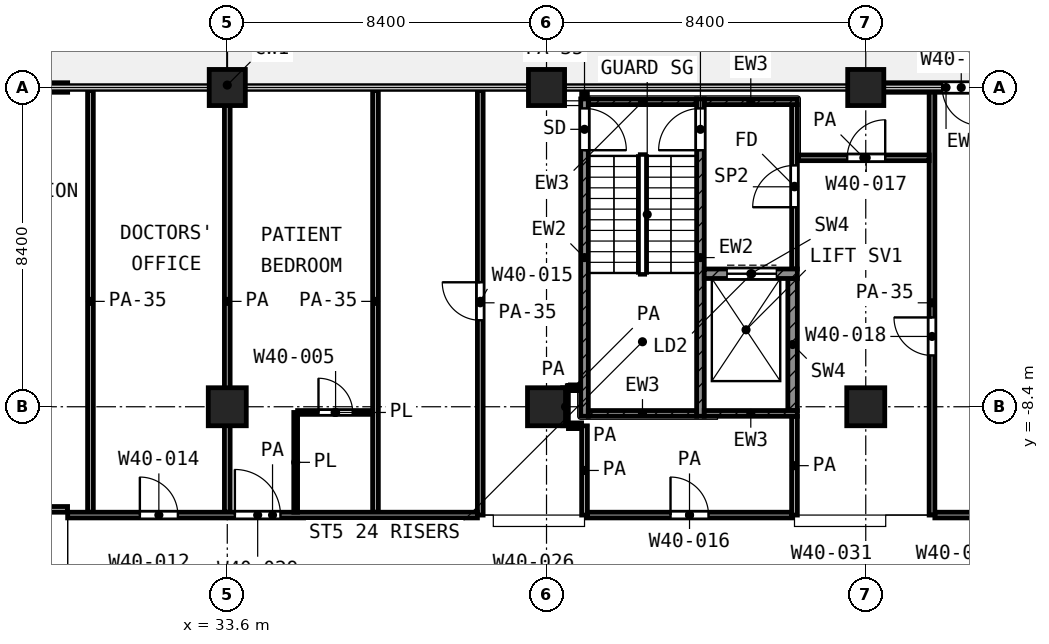
"""IFC4 building model, lengths in metres.
Left out: names, types, materials, properties, quantities, classifications, styles, units other than length and angle.
Written with IfcOpenShell. Run it as: python <this file> out.ifc"""

import sys

from ifc_helpers import new_model, si_unit, direction, frame, frame_2d, origin, origin_2d, place, context, subcontext, project, spatial, rectangle, extrude, element, fill, save


model = new_model("IFC4")
c1 = context("Model", 3, precision=1e-05, world=origin(), true_north=direction((0.0, 1.0)))
c2 = subcontext(c1, "Body", "Model", "MODEL_VIEW")
j1 = project(units=[si_unit("LENGTHUNIT", "METRE"), si_unit("PLANEANGLEUNIT", "RADIAN")], contexts=[c1])
p1 = place(None, origin())
s1 = spatial("IfcSite", under=j1, at=p1, CompositionType="ELEMENT")
p2 = place(p1, origin())
s2 = spatial("IfcBuilding", under=s1, at=p2, CompositionType="ELEMENT")
p3 = place(p2, frame((0.0, 0.0, 196.2)))
s3 = spatial("IfcBuildingStorey", under=s2, at=p3, CompositionType="ELEMENT", Elevation=196.2)
for number, where, z_axis, x_axis in (
    (1, (33.6, 0.0, 0.0), (0.0, 0.0, 1.0), (1.0, 0.0, 0.0)),
    (2, (42.0, 0.0, 0.0), (0.0, 0.0, 1.0), (1.0, 0.0, 0.0)),
    (3, (50.4, 0.0, 0.0), (0.0, 0.0, 1.0), (1.0, 0.0, 0.0)),
):
    element("IfcColumn", number, at=place(p3, frame(where, z_axis=z_axis, x_axis=x_axis)), inside=s3, PredefinedType="COLUMN", context=c2, shape_type="SweptSolid", body=[
        extrude(rectangle(XDim=0.95, YDim=0.95, at=origin_2d()), origin(), (0.0, 0.0, 1.0), 4.2),
    ])
for number, where, z_axis, x_axis in (
    (4, (33.6, -8.4, 0.0), (0.0, 0.0, 1.0), (1.0, 0.0, 0.0)),
    (5, (42.0, -8.4, 0.0), (0.0, 0.0, 1.0), (1.0, 0.0, 0.0)),
    (6, (50.4, -8.4, 0.0), (0.0, 0.0, 1.0), (1.0, 0.0, 0.0)),
):
    element("IfcColumn", number, at=place(p3, frame(where, z_axis=z_axis, x_axis=x_axis)), inside=s3, PredefinedType="COLUMN", context=c2, shape_type="SweptSolid", body=[
        extrude(rectangle(XDim=1.0, YDim=1.0, at=origin_2d()), origin(), (0.0, 0.0, 1.0), 4.2),
    ])
p4 = place(p3, frame((54.15, 0.0, 0.0), z_axis=(0.0, 0.0, 1.0), x_axis=(-1.0, 0.0, 0.0)))
e7 = element("IfcWall", 7, at=p4, inside=s3, PredefinedType="SOLIDWALL", context=c2, shape_type="SweptSolid", body=[
    extrude(rectangle(XDim=3.275, YDim=0.25, at=frame_2d((1.637, 0.0))), origin(), (0.0, 0.0, 1.0), 2.58),
])
p5 = place(p4, frame((0.738, 0.0, 0.0)))
e8 = element("IfcOpeningElement", 8, at=p5, cuts=e7, PredefinedType="OPENING", context=c2, shape_type="SweptSolid", body=[
    extrude(rectangle(XDim=1.0, YDim=2.1, at=frame_2d((0.5, 1.05))), frame((0.0, 0.135, 0.0), z_axis=(0.0, -1.0, 0.0), x_axis=(1.0, 0.0, 0.0)), (0.0, 0.0, 1.0), 0.27),
])
p6 = place(p3, frame((29.4, 0.0, 0.0), z_axis=(0.0, 0.0, 1.0), x_axis=(-1.0, 0.0, 0.0)))
e9 = element("IfcWall", 9, at=p6, inside=s3, PredefinedType="SOLIDWALL", context=c2, shape_type="SweptSolid", body=[
    extrude(rectangle(XDim=3.725, YDim=0.25, at=frame_2d((1.862, 0.0))), origin(), (0.0, 0.0, 1.0), 2.58),
])
p7 = place(p6, frame((0.962, 0.0, 0.0)))
e10 = element("IfcOpeningElement", 10, at=p7, cuts=e9, PredefinedType="OPENING", context=c2, shape_type="SweptSolid", body=[
    extrude(rectangle(XDim=1.8, YDim=2.1, at=frame_2d((0.9, 1.05))), frame((0.0, 0.135, 0.0), z_axis=(0.0, -1.0, 0.0), x_axis=(1.0, 0.0, 0.0)), (0.0, 0.0, 1.0), 0.27),
])
p8 = place(p3, frame((43.0, -8.65, 0.0), z_axis=(0.0, 0.0, 1.0), x_axis=(0.0, 1.0, 0.0)))
e11 = element("IfcWall", 11, at=p8, inside=s3, PredefinedType="SHEAR", context=c2, shape_type="SweptSolid", body=[
    extrude(rectangle(XDim=8.35, YDim=0.2, at=frame_2d((4.175, 0.0))), origin(), (0.0, 0.0, 1.0), 3.6),
])
p9 = place(p8, frame((7.0, 0.0, 0.0)))
e12 = element("IfcOpeningElement", 12, at=p9, cuts=e11, PredefinedType="OPENING", context=c2, shape_type="SweptSolid", body=[
    extrude(rectangle(XDim=1.1, YDim=2.1, at=frame_2d((0.55, 1.05))), frame((0.0, 0.11, 0.0), z_axis=(0.0, -1.0, 0.0), x_axis=(1.0, 0.0, 0.0)), (0.0, 0.0, 1.0), 0.22),
])
p10 = place(p3, frame((46.05, -8.65, 0.0), z_axis=(0.0, 0.0, 1.0), x_axis=(0.0, 1.0, 0.0)))
e13 = element("IfcWall", 13, at=p10, inside=s3, PredefinedType="SHEAR", context=c2, shape_type="SweptSolid", body=[
    extrude(rectangle(XDim=8.35, YDim=0.2, at=frame_2d((4.175, 0.0))), origin(), (0.0, 0.0, 1.0), 3.6),
])
p11 = place(p10, frame((7.0, 0.0, 0.0)))
e14 = element("IfcOpeningElement", 14, at=p11, cuts=e13, PredefinedType="OPENING", context=c2, shape_type="SweptSolid", body=[
    extrude(rectangle(XDim=1.1, YDim=2.1, at=frame_2d((0.55, 1.05))), frame((0.0, 0.11, 0.0), z_axis=(0.0, -1.0, 0.0), x_axis=(1.0, 0.0, 0.0)), (0.0, 0.0, 1.0), 0.22),
])
p12 = place(p3, frame((43.1, -0.375, 0.0), z_axis=(0.0, 0.0, 1.0), x_axis=(1.0, 0.0, 0.0)))
e15 = element("IfcWall", 15, at=p12, inside=s3, PredefinedType="SHEAR", context=c2, shape_type="SweptSolid", body=[
    extrude(rectangle(XDim=2.85, YDim=0.15, at=frame_2d((1.425, 0.0))), origin(), (0.0, 0.0, 1.0), 3.6),
])
p13 = place(p3, frame((46.15, -0.375, 0.0), z_axis=(0.0, 0.0, 1.0), x_axis=(1.0, 0.0, 0.0)))
e16 = element("IfcWall", 16, at=p13, inside=s3, PredefinedType="SHEAR", context=c2, shape_type="SweptSolid", body=[
    extrude(rectangle(XDim=2.45, YDim=0.15, at=frame_2d((1.225, 0.0))), origin(), (0.0, 0.0, 1.0), 3.6),
])
p14 = place(p3, frame((43.1, -8.575, 0.0), z_axis=(0.0, 0.0, 1.0), x_axis=(1.0, 0.0, 0.0)))
e17 = element("IfcWall", 17, at=p14, inside=s3, PredefinedType="SHEAR", context=c2, shape_type="SweptSolid", body=[
    extrude(rectangle(XDim=2.85, YDim=0.15, at=frame_2d((1.425, 0.0))), origin(), (0.0, 0.0, 1.0), 3.6),
])
p15 = place(p3, frame((46.15, -8.575, 0.0), z_axis=(0.0, 0.0, 1.0), x_axis=(1.0, 0.0, 0.0)))
e18 = element("IfcWall", 18, at=p15, inside=s3, PredefinedType="SHEAR", context=c2, shape_type="SweptSolid", body=[
    extrude(rectangle(XDim=2.45, YDim=0.15, at=frame_2d((1.225, 0.0))), origin(), (0.0, 0.0, 1.0), 3.6),
])
p16 = place(p3, frame((46.15, -4.9, 0.0), z_axis=(0.0, 0.0, 1.0), x_axis=(1.0, 0.0, 0.0)))
e19 = element("IfcWall", 19, at=p16, inside=s3, PredefinedType="SHEAR", context=c2, shape_type="SweptSolid", body=[
    extrude(rectangle(XDim=2.45, YDim=0.25, at=frame_2d((1.225, 0.0))), origin(), (0.0, 0.0, 1.0), 3.6),
])
p17 = place(p16, frame((0.6, 0.0, 0.0)))
e20 = element("IfcOpeningElement", 20, at=p17, cuts=e19, PredefinedType="OPENING", context=c2, shape_type="SweptSolid", body=[
    extrude(rectangle(XDim=1.3, YDim=2.1, at=frame_2d((0.65, 1.05))), frame((0.0, 0.135, 0.0), z_axis=(0.0, -1.0, 0.0), x_axis=(1.0, 0.0, 0.0)), (0.0, 0.0, 1.0), 0.27),
])
p18 = place(p3, frame((48.475, -8.5, 0.0), z_axis=(0.0, 0.0, 1.0), x_axis=(0.0, 1.0, 0.0)))
e21 = element("IfcWall", 21, at=p18, inside=s3, PredefinedType="SHEAR", context=c2, shape_type="SweptSolid", body=[
    extrude(rectangle(XDim=3.475, YDim=0.25, at=frame_2d((1.738, 0.0))), origin(), (0.0, 0.0, 1.0), 3.6),
])
p19 = place(p3, frame((48.525, -4.775, 0.0), z_axis=(0.0, 0.0, 1.0), x_axis=(0.0, 1.0, 0.0)))
e22 = element("IfcWall", 22, at=p19, inside=s3, PredefinedType="PARTITIONING", context=c2, shape_type="SweptSolid", body=[
    extrude(rectangle(XDim=4.325, YDim=0.15, at=frame_2d((2.163, 0.0))), origin(), (0.0, 0.0, 1.0), 3.6),
])
p20 = place(p19, frame((1.625, 0.0, 0.0)))
e23 = element("IfcOpeningElement", 23, at=p20, cuts=e22, PredefinedType="OPENING", context=c2, shape_type="SweptSolid", body=[
    extrude(rectangle(XDim=1.1, YDim=2.1, at=frame_2d((0.55, 1.05))), frame((0.0, 0.085, 0.0), z_axis=(0.0, -1.0, 0.0), x_axis=(1.0, 0.0, 0.0)), (0.0, 0.0, 1.0), 0.17),
])
p21 = place(p3, frame((35.45, -8.55, 0.0), z_axis=(0.0, 0.0, 1.0), x_axis=(1.0, 0.0, 0.0)))
e24 = element("IfcWall", 24, at=p21, inside=s3, PredefinedType="PARTITIONING", context=c2, shape_type="SweptSolid", body=[
    extrude(rectangle(XDim=1.975, YDim=0.1, at=frame_2d((0.988, 0.0))), origin(), (0.0, 0.0, 1.0), 3.6),
])
p22 = place(p21, frame((0.55, 0.0, 0.0)))
e25 = element("IfcOpeningElement", 25, at=p22, cuts=e24, PredefinedType="OPENING", context=c2, shape_type="SweptSolid", body=[
    extrude(rectangle(XDim=0.9, YDim=2.1, at=frame_2d((0.45, 1.05))), frame((0.0, 0.06, 0.0), z_axis=(0.0, -1.0, 0.0), x_axis=(1.0, 0.0, 0.0)), (0.0, 0.0, 1.0), 0.12),
])
p23 = place(p3, frame((35.4, -11.175, 0.0), z_axis=(0.0, 0.0, 1.0), x_axis=(0.0, 1.0, 0.0)))
e26 = element("IfcWall", 26, at=p23, inside=s3, PredefinedType="PARTITIONING", context=c2, shape_type="SweptSolid", body=[
    extrude(rectangle(XDim=2.625, YDim=0.1, at=frame_2d((1.312, 0.0))), origin(), (0.0, 0.0, 1.0), 3.6),
])
p24 = place(p3, frame((29.4, -11.25, 0.0), z_axis=(0.0, 0.0, 1.0), x_axis=(1.0, 0.0, 0.0)))
e27 = element("IfcWall", 27, at=p24, inside=s3, PredefinedType="PARTITIONING", context=c2, shape_type="SweptSolid", body=[
    extrude(rectangle(XDim=10.782, YDim=0.15, at=frame_2d((5.391, 0.0))), origin(), (0.0, 0.0, 1.0), 3.6),
])
p25 = place(p24, frame((1.9, 0.0, 0.0)))
e28 = element("IfcOpeningElement", 28, at=p25, cuts=e27, PredefinedType="OPENING", context=c2, shape_type="SweptSolid", body=[
    extrude(rectangle(XDim=1.0, YDim=2.1, at=frame_2d((0.5, 1.05))), frame((0.0, 0.085, 0.0), z_axis=(0.0, -1.0, 0.0), x_axis=(1.0, 0.0, 0.0)), (0.0, 0.0, 1.0), 0.17),
])
p26 = place(p24, frame((4.4, 0.0, 0.0)))
e29 = element("IfcOpeningElement", 29, at=p26, cuts=e27, PredefinedType="OPENING", context=c2, shape_type="SweptSolid", body=[
    extrude(rectangle(XDim=1.2, YDim=2.1, at=frame_2d((0.6, 1.05))), frame((0.0, 0.085, 0.0), z_axis=(0.0, -1.0, 0.0), x_axis=(1.0, 0.0, 0.0)), (0.0, 0.0, 1.0), 0.17),
])
p27 = place(p3, frame((43.075, -11.25, 0.0), z_axis=(0.0, 0.0, 1.0), x_axis=(1.0, 0.0, 0.0)))
e30 = element("IfcWall", 30, at=p27, inside=s3, PredefinedType="PARTITIONING", context=c2, shape_type="SweptSolid", body=[
    extrude(rectangle(XDim=5.375, YDim=0.15, at=frame_2d((2.688, 0.0))), origin(), (0.0, 0.0, 1.0), 3.6),
])
p28 = place(p27, frame((2.188, 0.0, 0.0)))
e31 = element("IfcOpeningElement", 31, at=p28, cuts=e30, PredefinedType="OPENING", context=c2, shape_type="SweptSolid", body=[
    extrude(rectangle(XDim=1.0, YDim=2.1, at=frame_2d((0.5, 1.05))), frame((0.0, 0.085, 0.0), z_axis=(0.0, -1.0, 0.0), x_axis=(1.0, 0.0, 0.0)), (0.0, 0.0, 1.0), 0.17),
])
p29 = place(p3, frame((52.218, -11.25, 0.0), z_axis=(0.0, 0.0, 1.0), x_axis=(1.0, 0.0, 0.0)))
e32 = element("IfcWall", 32, at=p29, inside=s3, PredefinedType="PARTITIONING", context=c2, shape_type="SweptSolid", body=[
    extrude(rectangle(XDim=14.902, YDim=0.15, at=frame_2d((7.451, 0.0))), origin(), (0.0, 0.0, 1.0), 3.6),
])
p30 = place(p29, frame((4.182, 0.0, 0.0)))
e33 = element("IfcOpeningElement", 33, at=p30, cuts=e32, PredefinedType="OPENING", context=c2, shape_type="SweptSolid", body=[
    extrude(rectangle(XDim=1.2, YDim=2.1, at=frame_2d((0.6, 1.05))), frame((0.0, 0.085, 0.0), z_axis=(0.0, -1.0, 0.0), x_axis=(1.0, 0.0, 0.0)), (0.0, 0.0, 1.0), 0.17),
])
p31 = place(p29, frame((10.032, 0.0, 0.0)))
e34 = element("IfcOpeningElement", 34, at=p31, cuts=e32, PredefinedType="OPENING", context=c2, shape_type="SweptSolid", body=[
    extrude(rectangle(XDim=1.5, YDim=2.1, at=frame_2d((0.75, 1.05))), frame((0.0, 0.085, 0.0), z_axis=(0.0, -1.0, 0.0), x_axis=(1.0, 0.0, 0.0)), (0.0, 0.0, 1.0), 0.17),
])
p32 = place(p3, frame((24.9, -11.1, 0.0), z_axis=(0.0, 0.0, 1.0), x_axis=(1.0, 0.0, 0.0)))
e35 = element("IfcWall", 35, at=p32, inside=s3, PredefinedType="PARTITIONING", context=c2, shape_type="SweptSolid", body=[
    extrude(rectangle(XDim=4.498, YDim=0.15, at=frame_2d((2.249, 0.0))), origin(), (0.0, 0.0, 1.0), 3.6),
])
p33 = place(p32, frame((1.799, 0.0, 0.0)))
e36 = element("IfcOpeningElement", 36, at=p33, cuts=e35, PredefinedType="OPENING", context=c2, shape_type="SweptSolid", body=[
    extrude(rectangle(XDim=1.2, YDim=2.1, at=frame_2d((0.6, 1.05))), frame((0.0, 0.085, 0.0), z_axis=(0.0, -1.0, 0.0), x_axis=(1.0, 0.0, 0.0)), (0.0, 0.0, 1.0), 0.17),
])
p34 = place(p3, frame((42.577, -8.9, 0.0), z_axis=(0.0, 0.0, 1.0), x_axis=(1.0, 0.0, 0.0)))
e37 = element("IfcWall", 37, at=p34, inside=s3, PredefinedType="PARTITIONING", context=c2, shape_type="SweptSolid", body=[
    extrude(rectangle(XDim=0.346, YDim=0.15, at=frame_2d((0.173, 0.0))), origin(), (0.0, 0.0, 1.0), 3.6),
])
p35 = place(p3, frame((42.577, -7.9, 0.0), z_axis=(0.0, 0.0, 1.0), x_axis=(1.0, 0.0, 0.0)))
e38 = element("IfcWall", 38, at=p35, inside=s3, PredefinedType="PARTITIONING", context=c2, shape_type="SweptSolid", body=[
    extrude(rectangle(XDim=0.243, YDim=0.15, at=frame_2d((0.122, 0.0))), origin(), (0.0, 0.0, 1.0), 3.6),
])
p36 = place(p3, frame((48.63, -1.85, 0.0), z_axis=(0.0, 0.0, 1.0), x_axis=(1.0, 0.0, 0.0)))
e39 = element("IfcWall", 39, at=p36, inside=s3, PredefinedType="PARTITIONING", context=c2, shape_type="SweptSolid", body=[
    extrude(rectangle(XDim=3.438, YDim=0.15, at=frame_2d((1.719, 0.0))), origin(), (0.0, 0.0, 1.0), 3.6),
])
p37 = place(p36, frame((1.282, 0.0, 0.0)))
e40 = element("IfcOpeningElement", 40, at=p37, cuts=e39, PredefinedType="OPENING", context=c2, shape_type="SweptSolid", body=[
    extrude(rectangle(XDim=1.0, YDim=2.1, at=frame_2d((0.5, 1.05))), frame((0.0, 0.085, 0.0), z_axis=(0.0, -1.0, 0.0), x_axis=(1.0, 0.0, 0.0)), (0.0, 0.0, 1.0), 0.17),
])
p38 = place(p3, frame((30.0, -11.175, 0.0), z_axis=(0.0, 0.0, 1.0), x_axis=(0.0, 1.0, 0.0)))
e41 = element("IfcWall", 41, at=p38, inside=s3, PredefinedType="PARTITIONING", context=c2, shape_type="SweptSolid", body=[
    extrude(rectangle(XDim=11.095, YDim=0.15, at=frame_2d((5.547, 0.0))), origin(), (0.0, 0.0, 1.0), 2.7),
])
p39 = place(p3, frame((33.6, -11.175, 0.0), z_axis=(0.0, 0.0, 1.0), x_axis=(0.0, 1.0, 0.0)))
e42 = element("IfcWall", 42, at=p39, inside=s3, PredefinedType="PARTITIONING", context=c2, shape_type="SweptSolid", body=[
    extrude(rectangle(XDim=11.095, YDim=0.15, at=frame_2d((5.547, 0.0))), origin(), (0.0, 0.0, 1.0), 3.6),
])
p40 = place(p3, frame((37.5, -11.175, 0.0), z_axis=(0.0, 0.0, 1.0), x_axis=(0.0, 1.0, 0.0)))
e43 = element("IfcWall", 43, at=p40, inside=s3, PredefinedType="PARTITIONING", context=c2, shape_type="SweptSolid", body=[
    extrude(rectangle(XDim=11.095, YDim=0.15, at=frame_2d((5.547, 0.0))), origin(), (0.0, 0.0, 1.0), 2.7),
])
p41 = place(p3, frame((40.257, -11.25, 0.0), z_axis=(0.0, 0.0, 1.0), x_axis=(0.0, 1.0, 0.0)))
e44 = element("IfcWall", 44, at=p41, inside=s3, PredefinedType="PARTITIONING", context=c2, shape_type="SweptSolid", body=[
    extrude(rectangle(XDim=11.17, YDim=0.15, at=frame_2d((5.585, 0.0))), origin(), (0.0, 0.0, 1.0), 2.7),
])
p42 = place(p41, frame((5.125, 0.0, 0.0)))
e45 = element("IfcOpeningElement", 45, at=p42, cuts=e44, PredefinedType="OPENING", context=c2, shape_type="SweptSolid", body=[
    extrude(rectangle(XDim=1.0, YDim=2.1, at=frame_2d((0.5, 1.05))), frame((0.0, 0.085, 0.0), z_axis=(0.0, -1.0, 0.0), x_axis=(1.0, 0.0, 0.0)), (0.0, 0.0, 1.0), 0.17),
])
p43 = place(p3, frame((42.5, -8.899, 0.0), z_axis=(0.0, 0.0, 1.0), x_axis=(0.0, 1.0, 0.0)))
e46 = element("IfcWall", 46, at=p43, inside=s3, PredefinedType="PARTITIONING", context=c2, shape_type="SweptSolid", body=[
    extrude(rectangle(XDim=0.997, YDim=0.15, at=frame_2d((0.499, 0.0))), origin(), (0.0, 0.0, 1.0), 3.6),
])
p44 = place(p3, frame((43.0, -11.25, 0.0), z_axis=(0.0, 0.0, 1.0), x_axis=(0.0, 1.0, 0.0)))
e47 = element("IfcWall", 47, at=p44, inside=s3, PredefinedType="PARTITIONING", context=c2, shape_type="SweptSolid", body=[
    extrude(rectangle(XDim=2.348, YDim=0.15, at=frame_2d((1.174, 0.0))), origin(), (0.0, 0.0, 1.0), 3.6),
])
p45 = place(p3, frame((43.0, -0.27, 0.0), z_axis=(0.0, 0.0, 1.0), x_axis=(0.0, 1.0, 0.0)))
e48 = element("IfcWall", 48, at=p45, inside=s3, PredefinedType="PARTITIONING", context=c2, shape_type="SweptSolid", body=[
    extrude(rectangle(XDim=0.19, YDim=0.15, at=frame_2d((0.095, 0.0))), origin(), (0.0, 0.0, 1.0), 2.7),
])
p46 = place(p3, frame((48.525, -11.25, 0.0), z_axis=(0.0, 0.0, 1.0), x_axis=(0.0, 1.0, 0.0)))
e49 = element("IfcWall", 49, at=p46, inside=s3, PredefinedType="PARTITIONING", context=c2, shape_type="SweptSolid", body=[
    extrude(rectangle(XDim=2.6, YDim=0.15, at=frame_2d((1.3, 0.0))), origin(), (0.0, 0.0, 1.0), 3.6),
])
p47 = place(p3, frame((52.143, -11.25, 0.0), z_axis=(0.0, 0.0, 1.0), x_axis=(0.0, 1.0, 0.0)))
e50 = element("IfcWall", 50, at=p47, inside=s3, PredefinedType="PARTITIONING", context=c2, shape_type="SweptSolid", body=[
    extrude(rectangle(XDim=11.17, YDim=0.15, at=frame_2d((5.585, 0.0))), origin(), (0.0, 0.0, 1.0), 2.7),
])
p48 = place(p47, frame((4.2, 0.0, 0.0)))
e51 = element("IfcOpeningElement", 51, at=p48, cuts=e50, PredefinedType="OPENING", context=c2, shape_type="SweptSolid", body=[
    extrude(rectangle(XDim=1.0, YDim=2.1, at=frame_2d((0.5, 1.05))), frame((0.0, 0.085, 0.0), z_axis=(0.0, -1.0, 0.0), x_axis=(1.0, 0.0, 0.0)), (0.0, 0.0, 1.0), 0.17),
])
p49 = place(p5, origin())
e52 = element("IfcDoor", 52, at=p49, inside=s3, OperationType="SINGLE_SWING_LEFT", PredefinedType="DOOR", context=c2, shape_type="SweptSolid", body=[
    extrude(rectangle(XDim=1.0, YDim=2.1, at=frame_2d((0.5, 1.05))), frame((0.0, 0.025, 0.0), z_axis=(0.0, -1.0, 0.0), x_axis=(1.0, 0.0, 0.0)), (0.0, 0.0, 1.0), 0.05),
])
fill(e8, e52)
p50 = place(p9, frame((1.1, 0.0, 0.0), z_axis=(0.0, 0.0, 1.0), x_axis=(-1.0, 0.0, 0.0)))
e53 = element("IfcDoor", 53, at=p50, inside=s3, OperationType="SINGLE_SWING_LEFT", PredefinedType="DOOR", context=c2, shape_type="SweptSolid", body=[
    extrude(rectangle(XDim=1.1, YDim=2.1, at=frame_2d((0.55, 1.05))), frame((0.0, 0.025, 0.0), z_axis=(0.0, -1.0, 0.0), x_axis=(1.0, 0.0, 0.0)), (0.0, 0.0, 1.0), 0.05),
])
fill(e12, e53)
p51 = place(p11, origin())
e54 = element("IfcDoor", 54, at=p51, inside=s3, OperationType="SINGLE_SWING_LEFT", PredefinedType="DOOR", context=c2, shape_type="SweptSolid", body=[
    extrude(rectangle(XDim=1.1, YDim=2.1, at=frame_2d((0.55, 1.05))), frame((0.0, 0.025, 0.0), z_axis=(0.0, -1.0, 0.0), x_axis=(1.0, 0.0, 0.0)), (0.0, 0.0, 1.0), 0.05),
])
fill(e14, e54)
p52 = place(p17, origin())
e55 = element("IfcDoor", 55, at=p52, inside=s3, OperationType="DOUBLE_DOOR_SLIDING", PredefinedType="DOOR", context=c2, shape_type="SweptSolid", body=[
    extrude(rectangle(XDim=1.3, YDim=2.1, at=frame_2d((0.65, 1.05))), frame((0.0, 0.025, 0.0), z_axis=(0.0, -1.0, 0.0), x_axis=(1.0, 0.0, 0.0)), (0.0, 0.0, 1.0), 0.05),
])
fill(e20, e55)
p53 = place(p20, origin())
e56 = element("IfcDoor", 56, at=p53, inside=s3, OperationType="SINGLE_SWING_LEFT", PredefinedType="DOOR", context=c2, shape_type="SweptSolid", body=[
    extrude(rectangle(XDim=1.1, YDim=2.1, at=frame_2d((0.55, 1.05))), frame((0.0, 0.025, 0.0), z_axis=(0.0, -1.0, 0.0), x_axis=(1.0, 0.0, 0.0)), (0.0, 0.0, 1.0), 0.05),
])
fill(e23, e56)
p54 = place(p25, origin())
e57 = element("IfcDoor", 57, at=p54, inside=s3, OperationType="SINGLE_SWING_LEFT", PredefinedType="DOOR", context=c2, shape_type="SweptSolid", body=[
    extrude(rectangle(XDim=1.0, YDim=2.1, at=frame_2d((0.5, 1.05))), frame((0.0, 0.025, 0.0), z_axis=(0.0, -1.0, 0.0), x_axis=(1.0, 0.0, 0.0)), (0.0, 0.0, 1.0), 0.05),
])
fill(e28, e57)
p55 = place(p26, origin())
e58 = element("IfcDoor", 58, at=p55, inside=s3, OperationType="SINGLE_SWING_LEFT", PredefinedType="DOOR", context=c2, shape_type="SweptSolid", body=[
    extrude(rectangle(XDim=1.2, YDim=2.1, at=frame_2d((0.6, 1.05))), frame((0.0, 0.025, 0.0), z_axis=(0.0, -1.0, 0.0), x_axis=(1.0, 0.0, 0.0)), (0.0, 0.0, 1.0), 0.05),
])
fill(e29, e58)
p56 = place(p22, origin())
e59 = element("IfcDoor", 59, at=p56, inside=s3, OperationType="SINGLE_SWING_LEFT", PredefinedType="DOOR", context=c2, shape_type="SweptSolid", body=[
    extrude(rectangle(XDim=0.9, YDim=2.1, at=frame_2d((0.45, 1.05))), frame((0.0, 0.025, 0.0), z_axis=(0.0, -1.0, 0.0), x_axis=(1.0, 0.0, 0.0)), (0.0, 0.0, 1.0), 0.05),
])
fill(e25, e59)
p57 = place(p42, origin())
e60 = element("IfcDoor", 60, at=p57, inside=s3, OperationType="SINGLE_SWING_RIGHT", PredefinedType="DOOR", context=c2, shape_type="SweptSolid", body=[
    extrude(rectangle(XDim=1.0, YDim=2.1, at=frame_2d((0.5, 1.05))), frame((0.0, 0.025, 0.0), z_axis=(0.0, -1.0, 0.0), x_axis=(1.0, 0.0, 0.0)), (0.0, 0.0, 1.0), 0.05),
])
fill(e45, e60)
p58 = place(p28, origin())
e61 = element("IfcDoor", 61, at=p58, inside=s3, OperationType="SINGLE_SWING_LEFT", PredefinedType="DOOR", context=c2, shape_type="SweptSolid", body=[
    extrude(rectangle(XDim=1.0, YDim=2.1, at=frame_2d((0.5, 1.05))), frame((0.0, 0.025, 0.0), z_axis=(0.0, -1.0, 0.0), x_axis=(1.0, 0.0, 0.0)), (0.0, 0.0, 1.0), 0.05),
])
fill(e31, e61)
p59 = place(p37, origin())
e62 = element("IfcDoor", 62, at=p59, inside=s3, OperationType="SINGLE_SWING_RIGHT", PredefinedType="DOOR", context=c2, shape_type="SweptSolid", body=[
    extrude(rectangle(XDim=1.0, YDim=2.1, at=frame_2d((0.5, 1.05))), frame((0.0, 0.025, 0.0), z_axis=(0.0, -1.0, 0.0), x_axis=(1.0, 0.0, 0.0)), (0.0, 0.0, 1.0), 0.05),
])
fill(e40, e62)
p60 = place(p48, origin())
e63 = element("IfcDoor", 63, at=p60, inside=s3, OperationType="SINGLE_SWING_RIGHT", PredefinedType="DOOR", context=c2, shape_type="SweptSolid", body=[
    extrude(rectangle(XDim=1.0, YDim=2.1, at=frame_2d((0.5, 1.05))), frame((0.0, 0.025, 0.0), z_axis=(0.0, -1.0, 0.0), x_axis=(1.0, 0.0, 0.0)), (0.0, 0.0, 1.0), 0.05),
])
fill(e51, e63)
save(model, sys.argv[1])
